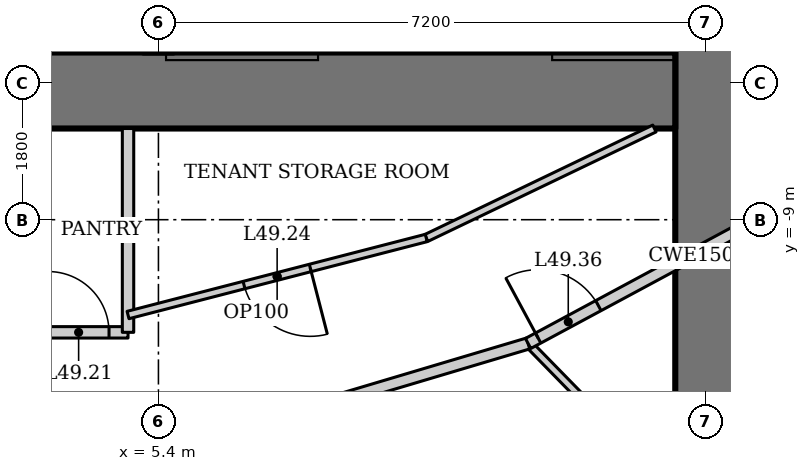
"""IFC4 building model, lengths in metres.
Left out: names, types, materials, properties, quantities, classifications, styles, units other than length and angle.
Written with IfcOpenShell. Run it as: python <this file> out.ifc"""

import sys

from ifc_helpers import new_model, si_unit, direction, frame, frame_2d, origin, place, context, subcontext, project, spatial, rectangle, extrude, element, fill, save


model = new_model("IFC4")
c1 = context("Model", 3, precision=1e-05, world=origin(), true_north=direction((0.0, 1.0)))
c2 = subcontext(c1, "Body", "Model", "MODEL_VIEW")
j1 = project(units=[si_unit("LENGTHUNIT", "METRE"), si_unit("PLANEANGLEUNIT", "RADIAN")], contexts=[c1])
p1 = place(None, origin())
s1 = spatial("IfcSite", under=j1, at=p1, CompositionType="ELEMENT")
p2 = place(p1, origin())
s2 = spatial("IfcBuilding", under=s1, at=p2, CompositionType="ELEMENT")
p3 = place(p2, frame((0.0, 0.0, 211.6)))
s3 = spatial("IfcBuildingStorey", under=s2, at=p3, CompositionType="ELEMENT", Elevation=211.6)
p4 = place(p3, frame((12.6, -13.0, 0.0), z_axis=(0.0, 0.0, 1.0), x_axis=(0.0, 1.0, 0.0)))
e1 = element("IfcWall", 1, at=p4, inside=s3, PredefinedType="SHEAR", context=c2, shape_type="SweptSolid", body=[
    extrude(rectangle(XDim=26.0, YDim=0.8, at=frame_2d((13.0, 0.0))), origin(), (0.0, 0.0, 1.0), 4.2),
])
p5 = place(p4, frame((12.1, 0.0, 0.0)))
e2 = element("IfcOpeningElement", 2, at=p5, cuts=e1, PredefinedType="OPENING", context=c2, shape_type="SweptSolid", body=[
    extrude(rectangle(XDim=1.8, YDim=2.1, at=frame_2d((0.9, 1.05))), frame((0.0, 0.41, 0.0), z_axis=(0.0, -1.0, 0.0), x_axis=(1.0, 0.0, 0.0)), (0.0, 0.0, 1.0), 0.82),
])
p6 = place(p3, frame((-12.2, -7.3, 0.0), z_axis=(0.0, 0.0, 1.0), x_axis=(1.0, 0.0, 0.0)))
e3 = element("IfcWall", 3, at=p6, inside=s3, PredefinedType="SHEAR", context=c2, shape_type="SweptSolid", body=[
    extrude(rectangle(XDim=24.4, YDim=1.0, at=frame_2d((12.2, 0.0))), origin(), (0.0, 0.0, 1.0), 4.2),
])
p7 = place(p3, frame((15.709, -16.199, 0.0), z_axis=(0.0, 0.0, 1.0), x_axis=(-0.699053895446, 0.715068983569, 0.0)))
e4 = element("IfcWall", 4, at=p7, inside=s3, PredefinedType="PARTITIONING", context=c2, shape_type="SweptSolid", body=[
    extrude(rectangle(XDim=7.79, YDim=0.1, at=frame_2d((3.895, 0.0))), origin(), (0.0, 0.0, 1.0), 3.41),
])
p8 = place(p3, frame((6.054, -11.882, 0.0), z_axis=(0.0, 0.0, 1.0), x_axis=(0.958384389306, 0.285480931648, 0.0)))
e5 = element("IfcWall", 5, at=p8, inside=s3, PredefinedType="PARTITIONING", context=c2, shape_type="SweptSolid", body=[
    extrude(rectangle(XDim=4.392, YDim=0.15, at=frame_2d((2.196, 0.0))), origin(), (0.0, 0.0, 1.0), 4.05),
])
p9 = place(p3, frame((10.264, -10.628, 0.0), z_axis=(0.0, 0.0, 1.0), x_axis=(0.88053863253, 0.47397438393, 0.0)))
e6 = element("IfcWall", 6, at=p9, inside=s3, PredefinedType="PARTITIONING", context=c2, shape_type="SweptSolid", body=[
    extrude(rectangle(XDim=4.875, YDim=0.15, at=frame_2d((2.438, 0.0))), origin(), (0.0, 0.0, 1.0), 4.05),
])
p10 = place(p9, frame((0.15, 0.0, 0.0)))
e7 = element("IfcOpeningElement", 7, at=p10, cuts=e6, PredefinedType="OPENING", context=c2, shape_type="SweptSolid", body=[
    extrude(rectangle(XDim=0.9, YDim=2.1, at=frame_2d((0.45, 1.05))), frame((0.0, 0.085, 0.0), z_axis=(0.0, -1.0, 0.0), x_axis=(1.0, 0.0, 0.0)), (0.0, 0.0, 1.0), 0.17),
])
p11 = place(p3, frame((-5.0, -10.482, 0.0), z_axis=(0.0, 0.0, 1.0), x_axis=(1.0, 0.0, 0.0)))
e8 = element("IfcWall", 8, at=p11, inside=s3, PredefinedType="SOLIDWALL", context=c2, shape_type="SweptSolid", body=[
    extrude(rectangle(XDim=10.0, YDim=0.15, at=frame_2d((5.0, 0.0))), origin(), (0.0, 0.0, 1.0), 4.05),
])
p12 = place(p11, frame((1.25, 0.0, 0.0)))
e9 = element("IfcOpeningElement", 9, at=p12, cuts=e8, PredefinedType="OPENING", context=c2, shape_type="SweptSolid", body=[
    extrude(rectangle(XDim=0.9, YDim=2.1, at=frame_2d((0.45, 1.05))), frame((0.0, 0.085, 0.0), z_axis=(0.0, -1.0, 0.0), x_axis=(1.0, 0.0, 0.0)), (0.0, 0.0, 1.0), 0.17),
])
p13 = place(p11, frame((4.65, 0.0, 0.0)))
e10 = element("IfcOpeningElement", 10, at=p13, cuts=e8, PredefinedType="OPENING", context=c2, shape_type="SweptSolid", body=[
    extrude(rectangle(XDim=0.9, YDim=2.1, at=frame_2d((0.45, 1.05))), frame((0.0, 0.085, 0.0), z_axis=(0.0, -1.0, 0.0), x_axis=(1.0, 0.0, 0.0)), (0.0, 0.0, 1.0), 0.17),
])
p14 = place(p11, frame((7.25, 0.0, 0.0)))
e11 = element("IfcOpeningElement", 11, at=p14, cuts=e8, PredefinedType="OPENING", context=c2, shape_type="SweptSolid", body=[
    extrude(rectangle(XDim=1.0, YDim=2.1, at=frame_2d((0.5, 1.05))), frame((0.0, 0.085, 0.0), z_axis=(0.0, -1.0, 0.0), x_axis=(1.0, 0.0, 0.0)), (0.0, 0.0, 1.0), 0.17),
])
p15 = place(p11, frame((8.95, 0.0, 0.0)))
e12 = element("IfcOpeningElement", 12, at=p15, cuts=e8, PredefinedType="OPENING", context=c2, shape_type="SweptSolid", body=[
    extrude(rectangle(XDim=0.8, YDim=2.1, at=frame_2d((0.4, 1.05))), frame((0.0, 0.085, 0.0), z_axis=(0.0, -1.0, 0.0), x_axis=(1.0, 0.0, 0.0)), (0.0, 0.0, 1.0), 0.17),
])
p16 = place(p3, frame((5.0, -7.8, 0.0), z_axis=(0.0, 0.0, 1.0), x_axis=(0.0, -1.0, 0.0)))
e13 = element("IfcWall", 13, at=p16, inside=s3, PredefinedType="SOLIDWALL", context=c2, shape_type="SweptSolid", body=[
    extrude(rectangle(XDim=2.682, YDim=0.15, at=frame_2d((1.341, 0.0))), origin(), (0.0, 0.0, 1.0), 4.05),
])
p17 = place(p3, frame((11.926, -7.8, 0.0), z_axis=(0.0, 0.0, 1.0), x_axis=(-0.901553947207, -0.432666708073, 0.0)))
e14 = element("IfcWall", 14, at=p17, inside=s3, PredefinedType="PARTITIONING", context=c2, shape_type="SweptSolid", body=[
    extrude(rectangle(XDim=3.33, YDim=0.1, at=frame_2d((1.665, 0.0))), origin(), (0.0, 0.0, 1.0), 4.05),
])
p18 = place(p3, frame((8.924, -9.241, 0.0), z_axis=(0.0, 0.0, 1.0), x_axis=(-0.968224167198, -0.250083910027, 0.0)))
e15 = element("IfcWall", 15, at=p18, inside=s3, PredefinedType="PARTITIONING", context=c2, shape_type="SweptSolid", body=[
    extrude(rectangle(XDim=4.052, YDim=0.1, at=frame_2d((2.026, 0.0))), origin(), (0.0, 0.0, 1.0), 4.05),
])
p19 = place(p18, frame((1.576, 0.0, 0.0)))
e16 = element("IfcOpeningElement", 16, at=p19, cuts=e15, PredefinedType="OPENING", context=c2, shape_type="SweptSolid", body=[
    extrude(rectangle(XDim=0.9, YDim=2.1, at=frame_2d((0.45, 1.05))), frame((0.0, 0.06, 0.0), z_axis=(0.0, -1.0, 0.0), x_axis=(1.0, 0.0, 0.0)), (0.0, 0.0, 1.0), 0.12),
])
p20 = place(p15, origin())
e17 = element("IfcDoor", 17, at=p20, inside=s3, OperationType="SINGLE_SWING_LEFT", PredefinedType="DOOR", context=c2, shape_type="SweptSolid", body=[
    extrude(rectangle(XDim=0.8, YDim=2.1, at=frame_2d((0.4, 1.05))), frame((0.0, 0.025, 0.0), z_axis=(0.0, -1.0, 0.0), x_axis=(1.0, 0.0, 0.0)), (0.0, 0.0, 1.0), 0.05),
])
fill(e12, e17)
p21 = place(p19, origin())
e18 = element("IfcDoor", 18, at=p21, inside=s3, OperationType="SINGLE_SWING_LEFT", PredefinedType="DOOR", context=c2, shape_type="SweptSolid", body=[
    extrude(rectangle(XDim=0.9, YDim=2.1, at=frame_2d((0.45, 1.05))), frame((0.0, 0.025, 0.0), z_axis=(0.0, -1.0, 0.0), x_axis=(1.0, 0.0, 0.0)), (0.0, 0.0, 1.0), 0.05),
])
fill(e16, e18)
p22 = place(p10, origin())
e19 = element("IfcDoor", 19, at=p22, inside=s3, OperationType="SINGLE_SWING_LEFT", PredefinedType="DOOR", context=c2, shape_type="SweptSolid", body=[
    extrude(rectangle(XDim=0.9, YDim=2.1, at=frame_2d((0.45, 1.05))), frame((0.0, 0.025, 0.0), z_axis=(0.0, -1.0, 0.0), x_axis=(1.0, 0.0, 0.0)), (0.0, 0.0, 1.0), 0.05),
])
fill(e7, e19)
save(model, sys.argv[1])
